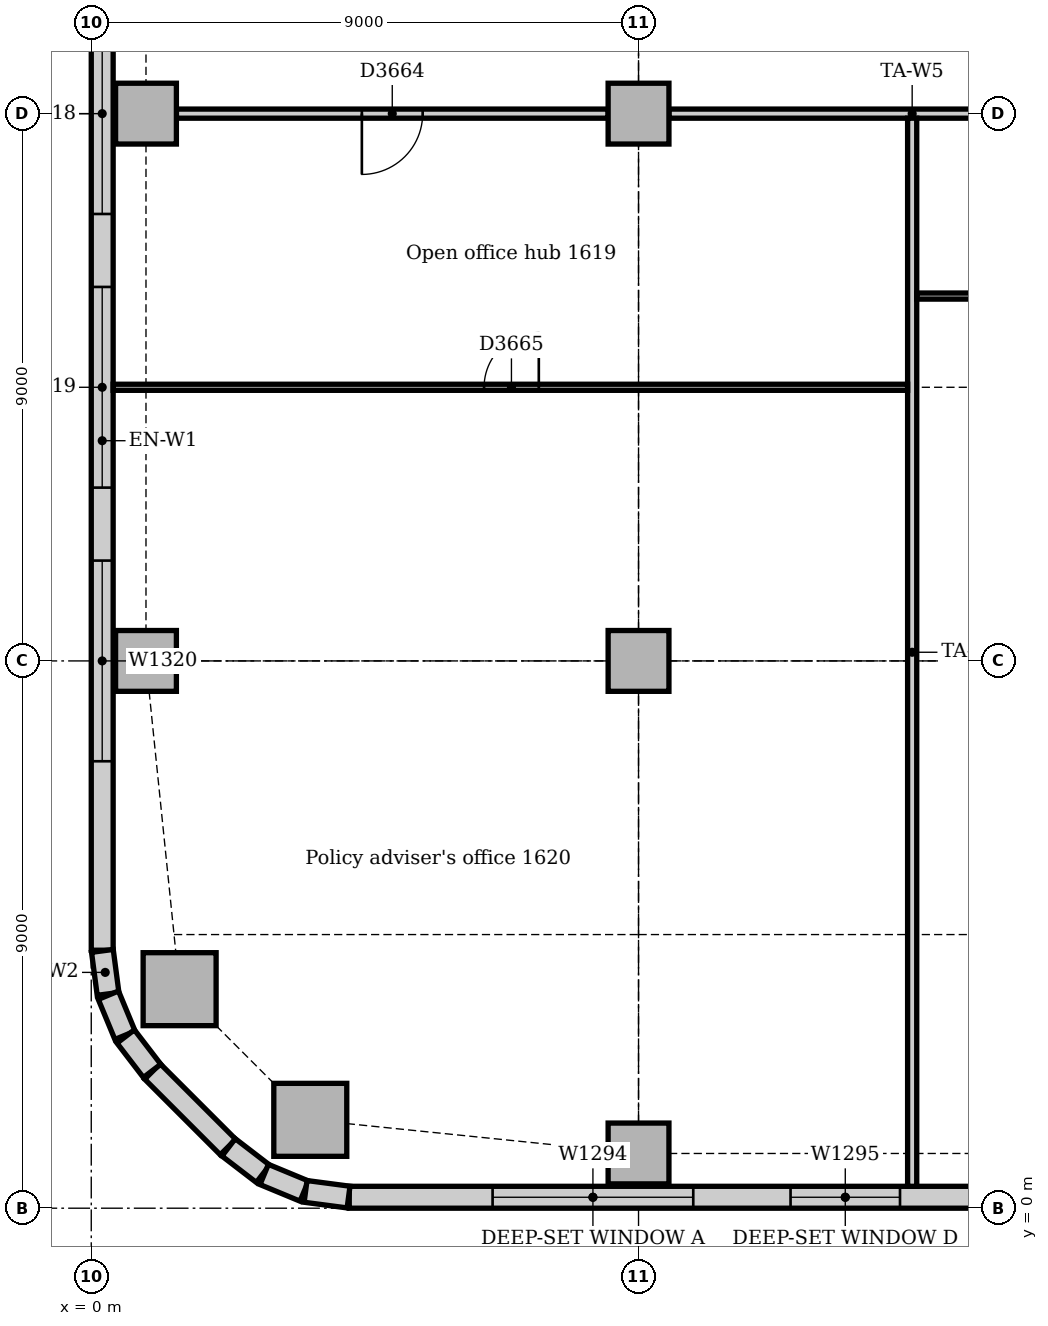
"""IFC4 building model, lengths in metres.
Left out: names, types, materials, properties, quantities, classifications, styles, units other than length and angle.
Written with IfcOpenShell. Run it as: python <this file> out.ifc"""

import sys

from ifc_helpers import new_model, si_unit, direction, frame, frame_2d, origin, origin_2d, place, context, subcontext, project, spatial, rectangle, extrude, element, fill, save


model = new_model("IFC4")
c1 = context("Model", 3, precision=1e-05, world=origin(), true_north=direction((0.0, 1.0)))
c2 = subcontext(c1, "Body", "Model", "MODEL_VIEW")
j1 = project(units=[si_unit("LENGTHUNIT", "METRE"), si_unit("PLANEANGLEUNIT", "RADIAN")], contexts=[c1])
p1 = place(None, origin())
s1 = spatial("IfcSite", under=j1, at=p1, CompositionType="ELEMENT")
p2 = place(p1, origin())
s2 = spatial("IfcBuilding", under=s1, at=p2, CompositionType="ELEMENT")
p3 = place(p2, frame((0.0, 0.0, 71.0)))
s3 = spatial("IfcBuildingStorey", under=s2, at=p3, CompositionType="ELEMENT", Elevation=71.0)
for number, where, z_axis, x_axis in (
    (1, (3.602, 1.453, 0.0), (0.0, 0.0, 1.0), (1.0, 0.0, 0.0)),
    (2, (1.453, 3.602, 0.0), (0.0, 0.0, 1.0), (1.0, 0.0, 0.0)),
):
    element("IfcColumn", number, at=place(p3, frame(where, z_axis=z_axis, x_axis=x_axis)), inside=s3, PredefinedType="COLUMN", context=c2, shape_type="SweptSolid", body=[
        extrude(rectangle(XDim=1.2, YDim=1.2, at=origin_2d()), origin(), (0.0, 0.0, 1.0), 3.85),
    ])
for number, where, z_axis, x_axis in (
    (3, (9.0, 0.9, 0.0), (0.0, 0.0, 1.0), (1.0, 0.0, 0.0)),
    (4, (0.9, 9.0, 0.0), (0.0, 0.0, 1.0), (1.0, 0.0, 0.0)),
    (5, (0.9, 18.0, 0.0), (0.0, 0.0, 1.0), (1.0, 0.0, 0.0)),
    (6, (9.0, 9.0, 0.0), (0.0, 0.0, 1.0), (1.0, 0.0, 0.0)),
    (7, (9.0, 18.0, 0.0), (0.0, 0.0, 1.0), (1.0, 0.0, 0.0)),
):
    element("IfcColumn", number, at=place(p3, frame(where, z_axis=z_axis, x_axis=x_axis)), inside=s3, PredefinedType="COLUMN", context=c2, shape_type="SweptSolid", body=[
        extrude(rectangle(XDim=1.0, YDim=1.0, at=origin_2d()), origin(), (0.0, 0.0, 1.0), 3.85),
    ])
p4 = place(p3, frame((4.243, 0.18, 0.0), z_axis=(0.0, 0.0, 1.0), x_axis=(1.0, 0.0, 0.0)))
e8 = element("IfcWall", 8, at=p4, inside=s3, PredefinedType="STANDARD", context=c2, shape_type="SweptSolid", body=[
    extrude(rectangle(XDim=44.015, YDim=0.36, at=frame_2d((22.007, 0.0))), origin(), (0.0, 0.0, 1.0), 3.85),
])
p5 = place(p4, frame((2.357, 0.0, 0.9)))
e9 = element("IfcOpeningElement", 9, at=p5, cuts=e8, PredefinedType="OPENING", context=c2, shape_type="SweptSolid", body=[
    extrude(rectangle(XDim=3.3, YDim=1.6, at=frame_2d((1.65, 0.8))), frame((0.0, 0.19, 0.0), z_axis=(0.0, -1.0, 0.0), x_axis=(1.0, 0.0, 0.0)), (0.0, 0.0, 1.0), 0.38),
])
p6 = place(p4, frame((7.257, 0.0, 0.9)))
e10 = element("IfcOpeningElement", 10, at=p6, cuts=e8, PredefinedType="OPENING", context=c2, shape_type="SweptSolid", body=[
    extrude(rectangle(XDim=1.8, YDim=1.6, at=frame_2d((0.9, 0.8))), frame((0.0, 0.19, 0.0), z_axis=(0.0, -1.0, 0.0), x_axis=(1.0, 0.0, 0.0)), (0.0, 0.0, 1.0), 0.38),
])
p7 = place(p4, frame((11.357, 0.0, 0.9)))
e11 = element("IfcOpeningElement", 11, at=p7, cuts=e8, PredefinedType="OPENING", context=c2, shape_type="SweptSolid", body=[
    extrude(rectangle(XDim=3.3, YDim=1.6, at=frame_2d((1.65, 0.8))), frame((0.0, 0.19, 0.0), z_axis=(0.0, -1.0, 0.0), x_axis=(1.0, 0.0, 0.0)), (0.0, 0.0, 1.0), 0.38),
])
p8 = place(p4, frame((15.857, 0.0, 0.9)))
e12 = element("IfcOpeningElement", 12, at=p8, cuts=e8, PredefinedType="OPENING", context=c2, shape_type="SweptSolid", body=[
    extrude(rectangle(XDim=3.3, YDim=1.6, at=frame_2d((1.65, 0.8))), frame((0.0, 0.19, 0.0), z_axis=(0.0, -1.0, 0.0), x_axis=(1.0, 0.0, 0.0)), (0.0, 0.0, 1.0), 0.38),
])
p9 = place(p4, frame((20.357, 0.0, 0.9)))
e13 = element("IfcOpeningElement", 13, at=p9, cuts=e8, PredefinedType="OPENING", context=c2, shape_type="SweptSolid", body=[
    extrude(rectangle(XDim=3.3, YDim=1.6, at=frame_2d((1.65, 0.8))), frame((0.0, 0.19, 0.0), z_axis=(0.0, -1.0, 0.0), x_axis=(1.0, 0.0, 0.0)), (0.0, 0.0, 1.0), 0.38),
])
p10 = place(p4, frame((24.857, 0.0, 0.9)))
e14 = element("IfcOpeningElement", 14, at=p10, cuts=e8, PredefinedType="OPENING", context=c2, shape_type="SweptSolid", body=[
    extrude(rectangle(XDim=3.3, YDim=1.6, at=frame_2d((1.65, 0.8))), frame((0.0, 0.19, 0.0), z_axis=(0.0, -1.0, 0.0), x_axis=(1.0, 0.0, 0.0)), (0.0, 0.0, 1.0), 0.38),
])
p11 = place(p4, frame((29.707, 0.0, 0.9)))
e15 = element("IfcOpeningElement", 15, at=p11, cuts=e8, PredefinedType="OPENING", context=c2, shape_type="SweptSolid", body=[
    extrude(rectangle(XDim=3.3, YDim=1.6, at=frame_2d((1.65, 0.8))), frame((0.0, 0.19, 0.0), z_axis=(0.0, -1.0, 0.0), x_axis=(1.0, 0.0, 0.0)), (0.0, 0.0, 1.0), 0.38),
])
p12 = place(p4, frame((34.257, 0.0, 0.9)))
e16 = element("IfcOpeningElement", 16, at=p12, cuts=e8, PredefinedType="OPENING", context=c2, shape_type="SweptSolid", body=[
    extrude(rectangle(XDim=1.8, YDim=1.6, at=frame_2d((0.9, 0.8))), frame((0.0, 0.19, 0.0), z_axis=(0.0, -1.0, 0.0), x_axis=(1.0, 0.0, 0.0)), (0.0, 0.0, 1.0), 0.38),
])
p13 = place(p4, frame((38.357, 0.0, 0.9)))
e17 = element("IfcOpeningElement", 17, at=p13, cuts=e8, PredefinedType="OPENING", context=c2, shape_type="SweptSolid", body=[
    extrude(rectangle(XDim=3.3, YDim=1.6, at=frame_2d((1.65, 0.8))), frame((0.0, 0.19, 0.0), z_axis=(0.0, -1.0, 0.0), x_axis=(1.0, 0.0, 0.0)), (0.0, 0.0, 1.0), 0.38),
])
p14 = place(p3, frame((0.18, 21.0, 0.0), z_axis=(0.0, 0.0, 1.0), x_axis=(0.0, -1.0, 0.0)))
e18 = element("IfcWall", 18, at=p14, inside=s3, PredefinedType="STANDARD", context=c2, shape_type="SweptSolid", body=[
    extrude(rectangle(XDim=16.757, YDim=0.36, at=frame_2d((8.379, 0.0))), origin(), (0.0, 0.0, 1.0), 3.85),
])
p15 = place(p14, frame((1.35, 0.0, 0.9)))
e19 = element("IfcOpeningElement", 19, at=p15, cuts=e18, PredefinedType="OPENING", context=c2, shape_type="SweptSolid", body=[
    extrude(rectangle(XDim=3.3, YDim=1.6, at=frame_2d((1.65, 0.8))), frame((0.0, 0.19, 0.0), z_axis=(0.0, -1.0, 0.0), x_axis=(1.0, 0.0, 0.0)), (0.0, 0.0, 1.0), 0.38),
])
p16 = place(p14, frame((5.85, 0.0, 0.9)))
e20 = element("IfcOpeningElement", 20, at=p16, cuts=e18, PredefinedType="OPENING", context=c2, shape_type="SweptSolid", body=[
    extrude(rectangle(XDim=3.3, YDim=1.6, at=frame_2d((1.65, 0.8))), frame((0.0, 0.19, 0.0), z_axis=(0.0, -1.0, 0.0), x_axis=(1.0, 0.0, 0.0)), (0.0, 0.0, 1.0), 0.38),
])
p17 = place(p14, frame((10.35, 0.0, 0.9)))
e21 = element("IfcOpeningElement", 21, at=p17, cuts=e18, PredefinedType="OPENING", context=c2, shape_type="SweptSolid", body=[
    extrude(rectangle(XDim=3.3, YDim=1.6, at=frame_2d((1.65, 0.8))), frame((0.0, 0.19, 0.0), z_axis=(0.0, -1.0, 0.0), x_axis=(1.0, 0.0, 0.0)), (0.0, 0.0, 1.0), 0.38),
])
p18 = place(p3, frame((1.006, 2.249, 0.0), z_axis=(0.0, 0.0, 1.0), x_axis=(0.707106781187, -0.707106781187, 0.0)))
e22 = element("IfcWall", 22, at=p18, inside=s3, PredefinedType="STANDARD", context=c2, shape_type="SweptSolid", body=[
    extrude(rectangle(XDim=1.757, YDim=0.36, at=frame_2d((0.879, 0.0))), origin(), (0.0, 0.0, 1.0), 3.85),
])
for number, where, z_axis, x_axis in (
    (23, (0.183, 4.231, 0.0), (0.0, 0.0, 1.0), (0.131, -0.991, 0.0)),
    (24, (0.282, 3.503, 0.0), (0.0, 0.0, 1.0), (0.383, -0.924, 0.0)),
):
    element("IfcWall", number, at=place(p3, frame(where, z_axis=z_axis, x_axis=x_axis)), inside=s3, PredefinedType="STANDARD", context=c2, shape_type="SweptSolid", body=[
        extrude(rectangle(XDim=0.713, YDim=0.36, at=frame_2d((0.356, 0.0))), origin(), (0.0, 0.0, 1.0), 3.85),
    ])
for number, where, z_axis, x_axis in (
    (25, (0.566, 2.825, 0.0), (0.0, 0.0, 1.0), (0.609, -0.793, 0.0)),
    (26, (2.259, 1.0, 0.0), (0.0, 0.0, 1.0), (0.793, -0.609, 0.0)),
):
    element("IfcWall", number, at=place(p3, frame(where, z_axis=z_axis, x_axis=x_axis)), inside=s3, PredefinedType="STANDARD", context=c2, shape_type="SweptSolid", body=[
        extrude(rectangle(XDim=0.713, YDim=0.36, at=frame_2d((0.357, 0.0))), origin(), (0.0, 0.0, 1.0), 3.85),
    ])
for number, where, z_axis, x_axis in (
    (27, (2.844, 0.555, 0.0), (0.0, 0.0, 1.0), (0.924, -0.383, 0.0)),
    (28, (3.524, 0.276, 0.0), (0.0, 0.0, 1.0), (0.991, -0.131, 0.0)),
):
    element("IfcWall", number, at=place(p3, frame(where, z_axis=z_axis, x_axis=x_axis)), inside=s3, PredefinedType="STANDARD", context=c2, shape_type="SweptSolid", body=[
        extrude(rectangle(XDim=0.713, YDim=0.36, at=frame_2d((0.356, 0.0))), origin(), (0.0, 0.0, 1.0), 3.85),
    ])
p19 = place(p3, frame((9.5, 18.0, 0.0), z_axis=(0.0, 0.0, 1.0), x_axis=(1.0, 0.0, 0.0)))
e29 = element("IfcWall", 29, at=p19, inside=s3, PredefinedType="PARTITIONING", context=c2, shape_type="SweptSolid", body=[
    extrude(rectangle(XDim=8.0, YDim=0.15, at=frame_2d((4.0, 0.0))), origin(), (0.0, 0.0, 1.0), 3.15),
])
p20 = place(p3, frame((1.4, 18.0, 0.0), z_axis=(0.0, 0.0, 1.0), x_axis=(1.0, 0.0, 0.0)))
e30 = element("IfcWall", 30, at=p20, inside=s3, PredefinedType="PARTITIONING", context=c2, shape_type="SweptSolid", body=[
    extrude(rectangle(XDim=7.1, YDim=0.15, at=frame_2d((3.55, 0.0))), origin(), (0.0, 0.0, 1.0), 3.15),
])
p21 = place(p20, frame((3.05, 0.0, 0.0)))
e31 = element("IfcOpeningElement", 31, at=p21, cuts=e30, PredefinedType="OPENING", context=c2, shape_type="SweptSolid", body=[
    extrude(rectangle(XDim=1.0, YDim=2.1, at=frame_2d((0.5, 1.05))), frame((0.0, 0.085, 0.0), z_axis=(0.0, -1.0, 0.0), x_axis=(1.0, 0.0, 0.0)), (0.0, 0.0, 1.0), 0.17),
])
p22 = place(p3, frame((13.5, 0.36, 0.0), z_axis=(0.0, 0.0, 1.0), x_axis=(0.0, 1.0, 0.0)))
e32 = element("IfcWall", 32, at=p22, inside=s3, PredefinedType="PARTITIONING", context=c2, shape_type="SweptSolid", body=[
    extrude(rectangle(XDim=17.565, YDim=0.15, at=frame_2d((8.783, 0.0))), origin(), (0.0, 0.0, 1.0), 3.85),
])
p23 = place(p3, frame((13.575, 15.0, 0.0), z_axis=(0.0, 0.0, 1.0), x_axis=(1.0, 0.0, 0.0)))
e33 = element("IfcWall", 33, at=p23, inside=s3, PredefinedType="PARTITIONING", context=c2, shape_type="SweptSolid", body=[
    extrude(rectangle(XDim=13.35, YDim=0.1, at=frame_2d((6.675, 0.0))), origin(), (0.0, 0.0, 1.0), 3.85),
])
p24 = place(p23, frame((6.2, 0.0, 0.0)))
e34 = element("IfcOpeningElement", 34, at=p24, cuts=e33, PredefinedType="OPENING", context=c2, shape_type="SweptSolid", body=[
    extrude(rectangle(XDim=0.9, YDim=2.1, at=frame_2d((0.45, 1.05))), frame((0.0, 0.06, 0.0), z_axis=(0.0, -1.0, 0.0), x_axis=(1.0, 0.0, 0.0)), (0.0, 0.0, 1.0), 0.12),
])
p25 = place(p3, frame((0.36, 13.5, 0.0), z_axis=(0.0, 0.0, 1.0), x_axis=(1.0, 0.0, 0.0)))
e35 = element("IfcWall", 35, at=p25, inside=s3, PredefinedType="PARTITIONING", context=c2, shape_type="SweptSolid", body=[
    extrude(rectangle(XDim=13.065, YDim=0.1, at=frame_2d((6.532, 0.0))), origin(), (0.0, 0.0, 1.0), 3.35),
])
p26 = place(p25, frame((6.1, 0.0, 0.0)))
e36 = element("IfcOpeningElement", 36, at=p26, cuts=e35, PredefinedType="OPENING", context=c2, shape_type="SweptSolid", body=[
    extrude(rectangle(XDim=0.9, YDim=2.1, at=frame_2d((0.45, 1.05))), frame((0.0, 0.06, 0.0), z_axis=(0.0, -1.0, 0.0), x_axis=(1.0, 0.0, 0.0)), (0.0, 0.0, 1.0), 0.12),
])
p27 = place(p5, origin())
e37 = element("IfcWindow", 37, at=p27, inside=s3, PartitioningType="SINGLE_PANEL", PredefinedType="WINDOW", context=c2, shape_type="SweptSolid", body=[
    extrude(rectangle(XDim=3.3, YDim=1.6, at=frame_2d((1.65, 0.8))), frame((0.0, 0.13, 0.0), z_axis=(0.0, -1.0, 0.0), x_axis=(1.0, 0.0, 0.0)), (0.0, 0.0, 1.0), 0.06),
])
fill(e9, e37)
p28 = place(p6, origin())
e38 = element("IfcWindow", 38, at=p28, inside=s3, PartitioningType="SINGLE_PANEL", PredefinedType="WINDOW", context=c2, shape_type="SweptSolid", body=[
    extrude(rectangle(XDim=1.8, YDim=1.6, at=frame_2d((0.9, 0.8))), frame((0.0, 0.13, 0.0), z_axis=(0.0, -1.0, 0.0), x_axis=(1.0, 0.0, 0.0)), (0.0, 0.0, 1.0), 0.06),
])
fill(e10, e38)
p29 = place(p15, origin())
e39 = element("IfcWindow", 39, at=p29, inside=s3, PartitioningType="SINGLE_PANEL", PredefinedType="WINDOW", context=c2, shape_type="SweptSolid", body=[
    extrude(rectangle(XDim=3.3, YDim=1.6, at=frame_2d((1.65, 0.8))), frame((0.0, 0.13, 0.0), z_axis=(0.0, -1.0, 0.0), x_axis=(1.0, 0.0, 0.0)), (0.0, 0.0, 1.0), 0.06),
])
fill(e19, e39)
p30 = place(p16, origin())
e40 = element("IfcWindow", 40, at=p30, inside=s3, PartitioningType="SINGLE_PANEL", PredefinedType="WINDOW", context=c2, shape_type="SweptSolid", body=[
    extrude(rectangle(XDim=3.3, YDim=1.6, at=frame_2d((1.65, 0.8))), frame((0.0, 0.13, 0.0), z_axis=(0.0, -1.0, 0.0), x_axis=(1.0, 0.0, 0.0)), (0.0, 0.0, 1.0), 0.06),
])
fill(e20, e40)
p31 = place(p17, origin())
e41 = element("IfcWindow", 41, at=p31, inside=s3, PartitioningType="SINGLE_PANEL", PredefinedType="WINDOW", context=c2, shape_type="SweptSolid", body=[
    extrude(rectangle(XDim=3.3, YDim=1.6, at=frame_2d((1.65, 0.8))), frame((0.0, 0.13, 0.0), z_axis=(0.0, -1.0, 0.0), x_axis=(1.0, 0.0, 0.0)), (0.0, 0.0, 1.0), 0.06),
])
fill(e21, e41)
p32 = place(p21, frame((1.0, 0.0, 0.0), z_axis=(0.0, 0.0, 1.0), x_axis=(-1.0, 0.0, 0.0)))
e42 = element("IfcDoor", 42, at=p32, inside=s3, OperationType="SINGLE_SWING_RIGHT", PredefinedType="DOOR", context=c2, shape_type="SweptSolid", body=[
    extrude(rectangle(XDim=1.0, YDim=2.1, at=frame_2d((0.5, 1.05))), frame((0.0, 0.025, 0.0), z_axis=(0.0, -1.0, 0.0), x_axis=(1.0, 0.0, 0.0)), (0.0, 0.0, 1.0), 0.05),
])
fill(e31, e42)
p33 = place(p26, origin())
e43 = element("IfcDoor", 43, at=p33, inside=s3, OperationType="SINGLE_SWING_RIGHT", PredefinedType="DOOR", context=c2, shape_type="SweptSolid", body=[
    extrude(rectangle(XDim=0.9, YDim=2.1, at=frame_2d((0.45, 1.05))), frame((0.0, 0.025, 0.0), z_axis=(0.0, -1.0, 0.0), x_axis=(1.0, 0.0, 0.0)), (0.0, 0.0, 1.0), 0.05),
])
fill(e36, e43)
save(model, sys.argv[1])
